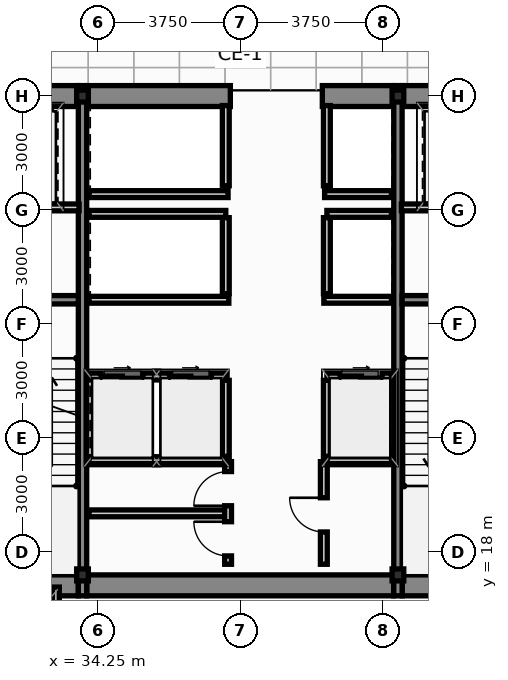
"""IFC4 building model, lengths in metres.
Left out: names, types, materials, properties, quantities, classifications, styles, units other than length and angle.
Written with IfcOpenShell. Run it as: python <this file> out.ifc"""

import sys

from ifc_helpers import new_model, si_unit, direction, frame, frame_2d, origin, origin_2d, place, context, subcontext, project, spatial, rectangle, i_section, extrude, source, transform, mapped, element, fill, save


model = new_model("IFC4")
c1 = context("Model", 3, precision=1e-05, world=origin(), true_north=direction((0.0, 1.0)))
c2 = subcontext(c1, "Body", "Model", "MODEL_VIEW")
j1 = project(units=[si_unit("LENGTHUNIT", "METRE"), si_unit("PLANEANGLEUNIT", "RADIAN")], contexts=[c1])
p1 = place(None, origin())
s1 = spatial("IfcSite", under=j1, at=p1, CompositionType="ELEMENT")
p2 = place(p1, origin())
s2 = spatial("IfcBuilding", under=s1, at=p2, CompositionType="ELEMENT")
p3 = place(p2, frame((0.0, 0.0, 5.4)))
s3 = spatial("IfcBuildingStorey", under=s2, at=p3, CompositionType="ELEMENT", Elevation=5.4)
m1 = source(origin(), c2, "Body", "SweptSolid", [
    extrude(i_section(OverallWidth=0.307, OverallDepth=0.315, WebThickness=0.012, FlangeThickness=0.019, at=origin_2d()), origin(), (0.0, 0.0, 1.0), 4.8),
])
for number, where, z_axis, x_axis in (
    (1, (33.85, 17.4, 0.0), (0.0, 0.0, 1.0), (1.0, 0.0, 0.0)),
    (2, (42.15, 17.4, 0.0), (0.0, 0.0, 1.0), (1.0, 0.0, 0.0)),
    (3, (33.85, 30.0, 0.0), (0.0, 0.0, 1.0), (1.0, 0.0, 0.0)),
    (4, (42.15, 30.0, 0.0), (0.0, 0.0, 1.0), (1.0, 0.0, 0.0)),
):
    element("IfcColumn", number, at=place(p3, frame(where, z_axis=z_axis, x_axis=x_axis)), inside=s3, PredefinedType="COLUMN", context=c2, shape_type="MappedRepresentation", body=[
        mapped(m1, transform((0.0, 0.0, 0.0), scale=1.0)),
    ])
p4 = place(p3, frame((30.84, 17.125, 0.0), z_axis=(0.0, 0.0, 1.0), x_axis=(1.0, 0.0, 0.0)))
e5 = element("IfcWall", 5, at=p4, inside=s3, PredefinedType="SHEAR", context=c2, shape_type="SweptSolid", body=[
    extrude(rectangle(XDim=2.9, YDim=0.55, at=frame_2d((1.45, 0.0))), origin(), (0.0, 0.0, 1.0), 4.8),
])
p5 = place(p3, frame((33.96, 17.125, 0.0), z_axis=(0.0, 0.0, 1.0), x_axis=(1.0, 0.0, 0.0)))
e6 = element("IfcWall", 6, at=p5, inside=s3, PredefinedType="SHEAR", context=c2, shape_type="SweptSolid", body=[
    extrude(rectangle(XDim=8.08, YDim=0.55, at=frame_2d((4.04, 0.0))), origin(), (0.0, 0.0, 1.0), 4.8),
])
for number, where, z_axis, x_axis in (
    (7, (42.26, 17.125, 0.0), (0.0, 0.0, 1.0), (1.0, 0.0, 0.0)),
    (8, (30.84, 30.0, 0.0), (0.0, 0.0, 1.0), (1.0, 0.0, 0.0)),
):
    element("IfcWall", number, at=place(p3, frame(where, z_axis=z_axis, x_axis=x_axis)), inside=s3, PredefinedType="SHEAR", context=c2, shape_type="SweptSolid", body=[
        extrude(rectangle(XDim=2.9, YDim=0.55, at=frame_2d((1.45, 0.0))), origin(), (0.0, 0.0, 1.0), 4.8),
    ])
p6 = place(p3, frame((33.96, 30.0, 0.0), z_axis=(0.0, 0.0, 1.0), x_axis=(1.0, 0.0, 0.0)))
e9 = element("IfcWall", 9, at=p6, inside=s3, PredefinedType="SHEAR", context=c2, shape_type="SweptSolid", body=[
    extrude(rectangle(XDim=3.78, YDim=0.55, at=frame_2d((1.89, 0.0))), origin(), (0.0, 0.0, 1.0), 4.8),
])
p7 = place(p3, frame((40.16, 30.0, 0.0), z_axis=(0.0, 0.0, 1.0), x_axis=(1.0, 0.0, 0.0)))
e10 = element("IfcWall", 10, at=p7, inside=s3, PredefinedType="SHEAR", context=c2, shape_type="SweptSolid", body=[
    extrude(rectangle(XDim=1.88, YDim=0.55, at=frame_2d((0.94, 0.0))), origin(), (0.0, 0.0, 1.0), 4.8),
])
p8 = place(p3, frame((42.26, 30.0, 0.0), z_axis=(0.0, 0.0, 1.0), x_axis=(1.0, 0.0, 0.0)))
e11 = element("IfcWall", 11, at=p8, inside=s3, PredefinedType="SHEAR", context=c2, shape_type="SweptSolid", body=[
    extrude(rectangle(XDim=2.9, YDim=0.55, at=frame_2d((1.45, 0.0))), origin(), (0.0, 0.0, 1.0), 4.8),
])
for number, where, z_axis, x_axis in (
    (12, (33.85, 16.85, 0.0), (0.0, 0.0, 1.0), (0.0, 1.0, 0.0)),
    (13, (42.15, 16.85, 0.0), (0.0, 0.0, 1.0), (0.0, 1.0, 0.0)),
):
    element("IfcWall", number, at=place(p3, frame(where, z_axis=z_axis, x_axis=x_axis)), inside=s3, PredefinedType="SHEAR", context=c2, shape_type="SweptSolid", body=[
        extrude(rectangle(XDim=13.425, YDim=0.22, at=frame_2d((6.712, 0.0))), origin(), (0.0, 0.0, 1.0), 4.8),
    ])
for number, where, z_axis, x_axis in (
    (14, (30.84, 24.64, 0.0), (0.0, 0.0, 1.0), (1.0, 0.0, 0.0)),
    (15, (42.26, 24.64, 0.0), (0.0, 0.0, 1.0), (1.0, 0.0, 0.0)),
):
    element("IfcWall", number, at=place(p3, frame(where, z_axis=z_axis, x_axis=x_axis)), inside=s3, PredefinedType="SHEAR", context=c2, shape_type="SweptSolid", body=[
        extrude(rectangle(XDim=2.9, YDim=0.22, at=frame_2d((1.45, 0.0))), origin(), (0.0, 0.0, 1.0), 4.8),
    ])
p9 = place(p3, frame((33.15, 14.42, 0.0), z_axis=(0.0, 0.0, 1.0), x_axis=(0.0, 1.0, 0.0)))
e16 = element("IfcWall", 16, at=p9, inside=s3, PredefinedType="PARTITIONING", context=c2, shape_type="SweptSolid", body=[
    extrude(rectangle(XDim=2.66, YDim=0.18, at=frame_2d((1.33, 0.0))), origin(), (0.0, 0.0, 1.0), 4.48),
])
p10 = place(p3, frame((34.02, 22.62, 0.0), z_axis=(0.0, 0.0, 1.0), x_axis=(1.0, 0.0, 0.0)))
e17 = element("IfcWall", 17, at=p10, inside=s3, PredefinedType="PARTITIONING", context=c2, shape_type="SweptSolid", body=[
    extrude(rectangle(XDim=3.6, YDim=0.18, at=frame_2d((1.8, 0.0))), origin(), (0.0, 0.0, 1.0), 4.48),
])
p11 = place(p10, frame((0.32, 0.0, 0.0)))
e18 = element("IfcOpeningElement", 18, at=p11, cuts=e17, PredefinedType="OPENING", context=c2, shape_type="SweptSolid", body=[
    extrude(rectangle(XDim=1.1, YDim=2.2, at=frame_2d((0.55, 1.1))), frame((0.0, 0.102, 0.0), z_axis=(0.0, -1.0, 0.0), x_axis=(1.0, 0.0, 0.0)), (0.0, 0.0, 1.0), 0.204),
])
p12 = place(p10, frame((2.12, 0.0, 0.0)))
e19 = element("IfcOpeningElement", 19, at=p12, cuts=e17, PredefinedType="OPENING", context=c2, shape_type="SweptSolid", body=[
    extrude(rectangle(XDim=1.1, YDim=2.2, at=frame_2d((0.55, 1.1))), frame((0.0, 0.102, 0.0), z_axis=(0.0, -1.0, 0.0), x_axis=(1.0, 0.0, 0.0)), (0.0, 0.0, 1.0), 0.204),
])
p13 = place(p3, frame((40.28, 22.62, 0.0), z_axis=(0.0, 0.0, 1.0), x_axis=(1.0, 0.0, 0.0)))
e20 = element("IfcWall", 20, at=p13, inside=s3, PredefinedType="PARTITIONING", context=c2, shape_type="SweptSolid", body=[
    extrude(rectangle(XDim=1.7, YDim=0.18, at=frame_2d((0.85, 0.0))), origin(), (0.0, 0.0, 1.0), 4.48),
])
p14 = place(p13, frame((0.35, 0.0, 0.0)))
e21 = element("IfcOpeningElement", 21, at=p14, cuts=e20, PredefinedType="OPENING", context=c2, shape_type="SweptSolid", body=[
    extrude(rectangle(XDim=1.1, YDim=2.2, at=frame_2d((0.55, 1.1))), frame((0.0, 0.102, 0.0), z_axis=(0.0, -1.0, 0.0), x_axis=(1.0, 0.0, 0.0)), (0.0, 0.0, 1.0), 0.204),
])
for number, where, z_axis, x_axis in (
    (22, (37.62, 20.52, 0.0), (0.0, 0.0, 1.0), (0.0, 1.0, 0.0)),
    (23, (40.28, 20.52, 0.0), (0.0, 0.0, 1.0), (0.0, 1.0, 0.0)),
):
    element("IfcWall", number, at=place(p3, frame(where, z_axis=z_axis, x_axis=x_axis)), inside=s3, PredefinedType="PARTITIONING", context=c2, shape_type="SweptSolid", body=[
        extrude(rectangle(XDim=2.0, YDim=0.18, at=frame_2d((1.0, 0.0))), origin(), (0.0, 0.0, 1.0), 4.48),
    ])
p15 = place(p3, frame((34.02, 26.9, 0.0), z_axis=(0.0, 0.0, 1.0), x_axis=(1.0, 0.0, 0.0)))
e24 = element("IfcWall", 24, at=p15, inside=s3, PredefinedType="PARTITIONING", context=c2, shape_type="SweptSolid", body=[
    extrude(rectangle(XDim=3.6, YDim=0.18, at=frame_2d((1.8, 0.0))), origin(), (0.0, 0.0, 1.0), 4.48),
])
p16 = place(p3, frame((40.28, 26.9, 0.0), z_axis=(0.0, 0.0, 1.0), x_axis=(1.0, 0.0, 0.0)))
e25 = element("IfcWall", 25, at=p16, inside=s3, PredefinedType="PARTITIONING", context=c2, shape_type="SweptSolid", body=[
    extrude(rectangle(XDim=1.7, YDim=0.18, at=frame_2d((0.85, 0.0))), origin(), (0.0, 0.0, 1.0), 4.48),
])
for number, where, z_axis, x_axis in (
    (26, (37.62, 24.8, 0.0), (0.0, 0.0, 1.0), (0.0, 1.0, 0.0)),
    (27, (40.28, 24.8, 0.0), (0.0, 0.0, 1.0), (0.0, 1.0, 0.0)),
):
    element("IfcWall", number, at=place(p3, frame(where, z_axis=z_axis, x_axis=x_axis)), inside=s3, PredefinedType="PARTITIONING", context=c2, shape_type="SweptSolid", body=[
        extrude(rectangle(XDim=2.0, YDim=0.18, at=frame_2d((1.0, 0.0))), origin(), (0.0, 0.0, 1.0), 4.48),
    ])
p17 = place(p3, frame((34.02, 24.64, 0.0), z_axis=(0.0, 0.0, 1.0), x_axis=(1.0, 0.0, 0.0)))
e28 = element("IfcWall", 28, at=p17, inside=s3, PredefinedType="PARTITIONING", context=c2, shape_type="SweptSolid", body=[
    extrude(rectangle(XDim=3.68, YDim=0.18, at=frame_2d((1.84, 0.0))), origin(), (0.0, 0.0, 1.0), 4.48),
])
p18 = place(p3, frame((40.2, 24.64, 0.0), z_axis=(0.0, 0.0, 1.0), x_axis=(1.0, 0.0, 0.0)))
e29 = element("IfcWall", 29, at=p18, inside=s3, PredefinedType="PARTITIONING", context=c2, shape_type="SweptSolid", body=[
    extrude(rectangle(XDim=1.78, YDim=0.18, at=frame_2d((0.89, 0.0))), origin(), (0.0, 0.0, 1.0), 4.48),
])
p19 = place(p3, frame((34.02, 27.42, 0.0), z_axis=(0.0, 0.0, 1.0), x_axis=(1.0, 0.0, 0.0)))
e30 = element("IfcWall", 30, at=p19, inside=s3, PredefinedType="PARTITIONING", context=c2, shape_type="SweptSolid", body=[
    extrude(rectangle(XDim=3.66, YDim=0.18, at=frame_2d((1.83, 0.0))), origin(), (0.0, 0.0, 1.0), 4.48),
])
p20 = place(p3, frame((40.22, 27.42, 0.0), z_axis=(0.0, 0.0, 1.0), x_axis=(1.0, 0.0, 0.0)))
e31 = element("IfcWall", 31, at=p20, inside=s3, PredefinedType="PARTITIONING", context=c2, shape_type="SweptSolid", body=[
    extrude(rectangle(XDim=1.76, YDim=0.18, at=frame_2d((0.88, 0.0))), origin(), (0.0, 0.0, 1.0), 4.48),
])
for number, where, z_axis, x_axis in (
    (32, (37.62, 27.64, 0.0), (0.0, 0.0, 1.0), (0.0, 1.0, 0.0)),
    (33, (40.28, 27.64, 0.0), (0.0, 0.0, 1.0), (0.0, 1.0, 0.0)),
):
    element("IfcWall", number, at=place(p3, frame(where, z_axis=z_axis, x_axis=x_axis)), inside=s3, PredefinedType="PARTITIONING", context=c2, shape_type="SweptSolid", body=[
        extrude(rectangle(XDim=2.11, YDim=0.18, at=frame_2d((1.055, 0.0))), origin(), (0.0, 0.0, 1.0), 4.48),
    ])
for number, where, z_axis, x_axis in (
    (34, (30.86, 27.07, 0.0), (0.0, 0.0, 1.0), (1.0, 0.0, 0.0)),
    (35, (42.24, 27.07, 0.0), (0.0, 0.0, 1.0), (1.0, 0.0, 0.0)),
):
    element("IfcWall", number, at=place(p3, frame(where, z_axis=z_axis, x_axis=x_axis)), inside=s3, PredefinedType="PARTITIONING", context=c2, shape_type="SweptSolid", body=[
        extrude(rectangle(XDim=2.9, YDim=0.18, at=frame_2d((1.45, 0.0))), origin(), (0.0, 0.0, 1.0), 4.48),
    ])
p21 = place(p3, frame((34.02, 20.42, 0.0), z_axis=(0.0, 0.0, 1.0), x_axis=(1.0, 0.0, 0.0)))
e36 = element("IfcWall", 36, at=p21, inside=s3, PredefinedType="PARTITIONING", context=c2, shape_type="SweptSolid", body=[
    extrude(rectangle(XDim=3.64, YDim=0.18, at=frame_2d((1.82, 0.0))), origin(), (0.0, 0.0, 1.0), 4.48),
])
p22 = place(p3, frame((40.22, 20.42, 0.0), z_axis=(0.0, 0.0, 1.0), x_axis=(1.0, 0.0, 0.0)))
e37 = element("IfcWall", 37, at=p22, inside=s3, PredefinedType="PARTITIONING", context=c2, shape_type="SweptSolid", body=[
    extrude(rectangle(XDim=1.76, YDim=0.18, at=frame_2d((0.88, 0.0))), origin(), (0.0, 0.0, 1.0), 4.48),
])
p23 = place(p3, frame((34.02, 19.02, 0.0), z_axis=(0.0, 0.0, 1.0), x_axis=(1.0, 0.0, 0.0)))
e38 = element("IfcWall", 38, at=p23, inside=s3, PredefinedType="PARTITIONING", context=c2, shape_type="SweptSolid", body=[
    extrude(rectangle(XDim=3.58, YDim=0.18, at=frame_2d((1.79, 0.0))), origin(), (0.0, 0.0, 1.0), 4.48),
])
p24 = place(p3, frame((37.68, 17.68, 0.0), z_axis=(0.0, 0.0, 1.0), x_axis=(0.0, 1.0, 0.0)))
e39 = element("IfcWall", 39, at=p24, inside=s3, PredefinedType="PARTITIONING", context=c2, shape_type="SweptSolid", body=[
    extrude(rectangle(XDim=2.7, YDim=0.18, at=frame_2d((1.35, 0.0))), origin(), (0.0, 0.0, 1.0), 4.48),
])
p25 = place(p24, frame((0.22, 0.0, 0.0)))
e40 = element("IfcOpeningElement", 40, at=p25, cuts=e39, PredefinedType="OPENING", context=c2, shape_type="SweptSolid", body=[
    extrude(rectangle(XDim=0.9, YDim=2.1, at=frame_2d((0.45, 1.05))), frame((0.0, 0.102, 0.0), z_axis=(0.0, -1.0, 0.0), x_axis=(1.0, 0.0, 0.0)), (0.0, 0.0, 1.0), 0.204),
])
p26 = place(p24, frame((1.54, 0.0, 0.0)))
e41 = element("IfcOpeningElement", 41, at=p26, cuts=e39, PredefinedType="OPENING", context=c2, shape_type="SweptSolid", body=[
    extrude(rectangle(XDim=0.9, YDim=2.1, at=frame_2d((0.45, 1.05))), frame((0.0, 0.102, 0.0), z_axis=(0.0, -1.0, 0.0), x_axis=(1.0, 0.0, 0.0)), (0.0, 0.0, 1.0), 0.204),
])
p27 = place(p3, frame((40.2, 17.68, 0.0), z_axis=(0.0, 0.0, 1.0), x_axis=(0.0, 1.0, 0.0)))
e42 = element("IfcWall", 42, at=p27, inside=s3, PredefinedType="PARTITIONING", context=c2, shape_type="SweptSolid", body=[
    extrude(rectangle(XDim=2.7, YDim=0.18, at=frame_2d((1.35, 0.0))), origin(), (0.0, 0.0, 1.0), 4.48),
])
p28 = place(p27, frame((0.85, 0.0, 0.0)))
e43 = element("IfcOpeningElement", 43, at=p28, cuts=e42, PredefinedType="OPENING", context=c2, shape_type="SweptSolid", body=[
    extrude(rectangle(XDim=0.9, YDim=2.1, at=frame_2d((0.45, 1.05))), frame((0.0, 0.102, 0.0), z_axis=(0.0, -1.0, 0.0), x_axis=(1.0, 0.0, 0.0)), (0.0, 0.0, 1.0), 0.204),
])
p29 = place(p11, origin())
e44 = element("IfcDoor", 44, at=p29, inside=s3, OperationType="SLIDING_TO_LEFT", PredefinedType="DOOR", context=c2, shape_type="SweptSolid", body=[
    extrude(rectangle(XDim=1.1, YDim=2.2, at=frame_2d((0.55, 1.1))), frame((0.0, 0.025, 0.0), z_axis=(0.0, -1.0, 0.0), x_axis=(1.0, 0.0, 0.0)), (0.0, 0.0, 1.0), 0.05),
])
fill(e18, e44)
p30 = place(p12, origin())
e45 = element("IfcDoor", 45, at=p30, inside=s3, OperationType="SLIDING_TO_RIGHT", PredefinedType="DOOR", context=c2, shape_type="SweptSolid", body=[
    extrude(rectangle(XDim=1.1, YDim=2.2, at=frame_2d((0.55, 1.1))), frame((0.0, 0.025, 0.0), z_axis=(0.0, -1.0, 0.0), x_axis=(1.0, 0.0, 0.0)), (0.0, 0.0, 1.0), 0.05),
])
fill(e19, e45)
p31 = place(p14, origin())
e46 = element("IfcDoor", 46, at=p31, inside=s3, OperationType="SLIDING_TO_LEFT", PredefinedType="DOOR", context=c2, shape_type="SweptSolid", body=[
    extrude(rectangle(XDim=1.1, YDim=2.2, at=frame_2d((0.55, 1.1))), frame((0.0, 0.025, 0.0), z_axis=(0.0, -1.0, 0.0), x_axis=(1.0, 0.0, 0.0)), (0.0, 0.0, 1.0), 0.05),
])
fill(e21, e46)
p32 = place(p25, origin())
e47 = element("IfcDoor", 47, at=p32, inside=s3, OperationType="SINGLE_SWING_RIGHT", PredefinedType="DOOR", context=c2, shape_type="SweptSolid", body=[
    extrude(rectangle(XDim=0.9, YDim=2.1, at=frame_2d((0.45, 1.05))), frame((0.0, 0.025, 0.0), z_axis=(0.0, -1.0, 0.0), x_axis=(1.0, 0.0, 0.0)), (0.0, 0.0, 1.0), 0.05),
])
fill(e40, e47)
p33 = place(p26, origin())
e48 = element("IfcDoor", 48, at=p33, inside=s3, OperationType="SINGLE_SWING_LEFT", PredefinedType="DOOR", context=c2, shape_type="SweptSolid", body=[
    extrude(rectangle(XDim=0.9, YDim=2.1, at=frame_2d((0.45, 1.05))), frame((0.0, 0.025, 0.0), z_axis=(0.0, -1.0, 0.0), x_axis=(1.0, 0.0, 0.0)), (0.0, 0.0, 1.0), 0.05),
])
fill(e41, e48)
p34 = place(p28, origin())
e49 = element("IfcDoor", 49, at=p34, inside=s3, OperationType="SINGLE_SWING_RIGHT", PredefinedType="DOOR", context=c2, shape_type="SweptSolid", body=[
    extrude(rectangle(XDim=0.9, YDim=2.1, at=frame_2d((0.45, 1.05))), frame((0.0, 0.025, 0.0), z_axis=(0.0, -1.0, 0.0), x_axis=(1.0, 0.0, 0.0)), (0.0, 0.0, 1.0), 0.05),
])
fill(e43, e49)
save(model, sys.argv[1])
